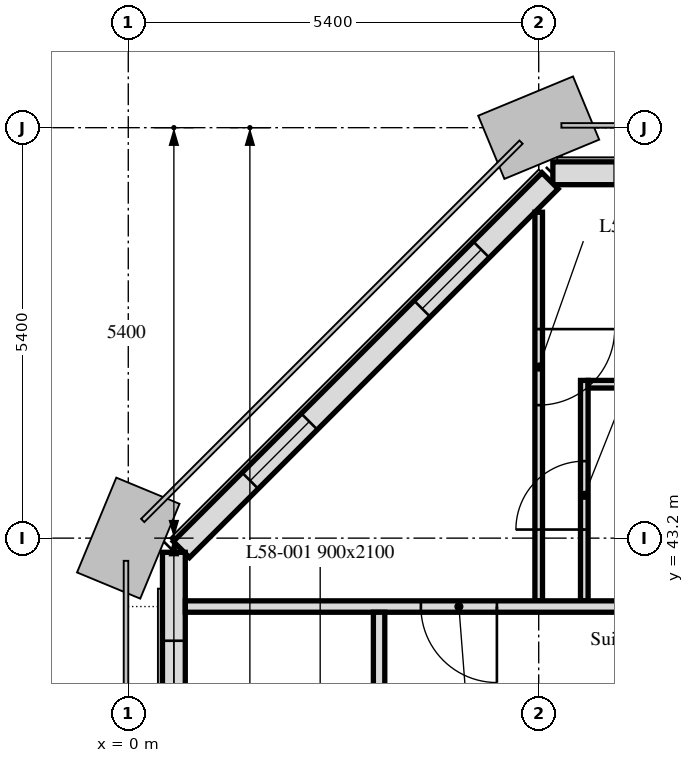
"""IFC4 building model, lengths in metres.
Left out: names, types, materials, properties, quantities, classifications, styles, units other than length and angle.
Written with IfcOpenShell. Run it as: python <this file> out.ifc"""

import sys

from ifc_helpers import new_model, si_unit, direction, frame, frame_2d, origin, place, context, subcontext, project, spatial, rectangle, extrude, element, fill, save


model = new_model("IFC4")
c1 = context("Model", 3, precision=1e-05, world=origin(), true_north=direction((0.0, 1.0)))
c2 = subcontext(c1, "Body", "Model", "MODEL_VIEW")
j1 = project(units=[si_unit("LENGTHUNIT", "METRE"), si_unit("PLANEANGLEUNIT", "RADIAN")], contexts=[c1])
p1 = place(None, origin())
s1 = spatial("IfcSite", under=j1, at=p1, CompositionType="ELEMENT")
p2 = place(p1, origin())
s2 = spatial("IfcBuilding", under=s1, at=p2, CompositionType="ELEMENT")
p3 = place(p2, frame((0.0, 0.0, 230.2)))
s3 = spatial("IfcBuildingStorey", under=s2, at=p3, CompositionType="ELEMENT", Elevation=230.2)
p4 = place(p3, frame((37.614, 48.0, 0.0), z_axis=(0.0, 0.0, 1.0), x_axis=(-1.0, 0.0, 0.0)))
e1 = element("IfcWall", 1, at=p4, inside=s3, PredefinedType="SOLIDWALL", context=c2, shape_type="SweptSolid", body=[
    extrude(rectangle(XDim=32.027, YDim=0.3, at=frame_2d((16.014, 0.0))), origin(), (0.0, 0.0, 1.0), 2.8),
])
p5 = place(p4, frame((2.764, 0.0, 0.9)))
e2 = element("IfcOpeningElement", 2, at=p5, cuts=e1, PredefinedType="OPENING", context=c2, shape_type="SweptSolid", body=[
    extrude(rectangle(XDim=1.1, YDim=1.7, at=frame_2d((0.55, 0.85))), frame((0.0, 0.16, 0.0), z_axis=(0.0, -1.0, 0.0), x_axis=(1.0, 0.0, 0.0)), (0.0, 0.0, 1.0), 0.32),
])
p6 = place(p4, frame((6.214, 0.0, 0.9)))
e3 = element("IfcOpeningElement", 3, at=p6, cuts=e1, PredefinedType="OPENING", context=c2, shape_type="SweptSolid", body=[
    extrude(rectangle(XDim=3.4, YDim=1.7, at=frame_2d((1.7, 0.85))), frame((0.0, 0.16, 0.0), z_axis=(0.0, -1.0, 0.0), x_axis=(1.0, 0.0, 0.0)), (0.0, 0.0, 1.0), 0.32),
])
p7 = place(p4, frame((13.564, 0.0, 0.9)))
e4 = element("IfcOpeningElement", 4, at=p7, cuts=e1, PredefinedType="OPENING", context=c2, shape_type="SweptSolid", body=[
    extrude(rectangle(XDim=1.1, YDim=1.7, at=frame_2d((0.55, 0.85))), frame((0.0, 0.16, 0.0), z_axis=(0.0, -1.0, 0.0), x_axis=(1.0, 0.0, 0.0)), (0.0, 0.0, 1.0), 0.32),
])
p8 = place(p4, frame((17.014, 0.0, 0.9)))
e5 = element("IfcOpeningElement", 5, at=p8, cuts=e1, PredefinedType="OPENING", context=c2, shape_type="SweptSolid", body=[
    extrude(rectangle(XDim=3.4, YDim=1.7, at=frame_2d((1.7, 0.85))), frame((0.0, 0.16, 0.0), z_axis=(0.0, -1.0, 0.0), x_axis=(1.0, 0.0, 0.0)), (0.0, 0.0, 1.0), 0.32),
])
p9 = place(p4, frame((24.364, 0.0, 0.9)))
e6 = element("IfcOpeningElement", 6, at=p9, cuts=e1, PredefinedType="OPENING", context=c2, shape_type="SweptSolid", body=[
    extrude(rectangle(XDim=1.1, YDim=1.7, at=frame_2d((0.55, 0.85))), frame((0.0, 0.16, 0.0), z_axis=(0.0, -1.0, 0.0), x_axis=(1.0, 0.0, 0.0)), (0.0, 0.0, 1.0), 0.32),
])
p10 = place(p4, frame((27.814, 0.0, 0.9)))
e7 = element("IfcOpeningElement", 7, at=p10, cuts=e1, PredefinedType="OPENING", context=c2, shape_type="SweptSolid", body=[
    extrude(rectangle(XDim=3.4, YDim=1.7, at=frame_2d((1.7, 0.85))), frame((0.0, 0.16, 0.0), z_axis=(0.0, -1.0, 0.0), x_axis=(1.0, 0.0, 0.0)), (0.0, 0.0, 1.0), 0.32),
])
p11 = place(p3, frame((5.55, 47.901, 0.0), z_axis=(0.0, 0.0, 1.0), x_axis=(-0.707106781187, -0.707106781187, 0.0)))
e8 = element("IfcWall", 8, at=p11, inside=s3, PredefinedType="SOLIDWALL", context=c2, shape_type="SweptSolid", body=[
    extrude(rectangle(XDim=6.86, YDim=0.3, at=frame_2d((3.43, 0.0))), origin(), (0.0, 0.0, 1.0), 2.8),
])
p12 = place(p11, frame((1.28, 0.0, 0.9)))
e9 = element("IfcOpeningElement", 9, at=p12, cuts=e8, PredefinedType="OPENING", context=c2, shape_type="SweptSolid", body=[
    extrude(rectangle(XDim=1.1, YDim=1.7, at=frame_2d((0.55, 0.85))), frame((0.0, 0.16, 0.0), z_axis=(0.0, -1.0, 0.0), x_axis=(1.0, 0.0, 0.0)), (0.0, 0.0, 1.0), 0.32),
])
p13 = place(p11, frame((4.48, 0.0, 0.9)))
e10 = element("IfcOpeningElement", 10, at=p13, cuts=e8, PredefinedType="OPENING", context=c2, shape_type="SweptSolid", body=[
    extrude(rectangle(XDim=1.1, YDim=1.7, at=frame_2d((0.55, 0.85))), frame((0.0, 0.16, 0.0), z_axis=(0.0, -1.0, 0.0), x_axis=(1.0, 0.0, 0.0)), (0.0, 0.0, 1.0), 0.32),
])
p14 = place(p3, frame((0.6, 43.014, 0.0), z_axis=(0.0, 0.0, 1.0), x_axis=(0.0, -1.0, 0.0)))
e11 = element("IfcWall", 11, at=p14, inside=s3, PredefinedType="SOLIDWALL", context=c2, shape_type="SweptSolid", body=[
    extrude(rectangle(XDim=32.027, YDim=0.3, at=frame_2d((16.014, 0.0))), origin(), (0.0, 0.0, 1.0), 2.8),
])
p15 = place(p14, frame((1.164, 0.0, 0.9)))
e12 = element("IfcOpeningElement", 12, at=p15, cuts=e11, PredefinedType="OPENING", context=c2, shape_type="SweptSolid", body=[
    extrude(rectangle(XDim=1.1, YDim=1.7, at=frame_2d((0.55, 0.85))), frame((0.0, 0.16, 0.0), z_axis=(0.0, -1.0, 0.0), x_axis=(1.0, 0.0, 0.0)), (0.0, 0.0, 1.0), 0.32),
])
p16 = place(p14, frame((2.589, 0.0, 0.9)))
e13 = element("IfcOpeningElement", 13, at=p16, cuts=e11, PredefinedType="OPENING", context=c2, shape_type="SweptSolid", body=[
    extrude(rectangle(XDim=0.65, YDim=1.7, at=frame_2d((0.325, 0.85))), frame((0.0, 0.16, 0.0), z_axis=(0.0, -1.0, 0.0), x_axis=(1.0, 0.0, 0.0)), (0.0, 0.0, 1.0), 0.32),
])
p17 = place(p14, frame((6.214, 0.0, 0.9)))
e14 = element("IfcOpeningElement", 14, at=p17, cuts=e11, PredefinedType="OPENING", context=c2, shape_type="SweptSolid", body=[
    extrude(rectangle(XDim=3.4, YDim=1.7, at=frame_2d((1.7, 0.85))), frame((0.0, 0.16, 0.0), z_axis=(0.0, -1.0, 0.0), x_axis=(1.0, 0.0, 0.0)), (0.0, 0.0, 1.0), 0.32),
])
p18 = place(p14, frame((11.964, 0.0, 0.9)))
e15 = element("IfcOpeningElement", 15, at=p18, cuts=e11, PredefinedType="OPENING", context=c2, shape_type="SweptSolid", body=[
    extrude(rectangle(XDim=1.1, YDim=1.7, at=frame_2d((0.55, 0.85))), frame((0.0, 0.16, 0.0), z_axis=(0.0, -1.0, 0.0), x_axis=(1.0, 0.0, 0.0)), (0.0, 0.0, 1.0), 0.32),
])
p19 = place(p14, frame((13.564, 0.0, 0.9)))
e16 = element("IfcOpeningElement", 16, at=p19, cuts=e11, PredefinedType="OPENING", context=c2, shape_type="SweptSolid", body=[
    extrude(rectangle(XDim=1.1, YDim=1.7, at=frame_2d((0.55, 0.85))), frame((0.0, 0.16, 0.0), z_axis=(0.0, -1.0, 0.0), x_axis=(1.0, 0.0, 0.0)), (0.0, 0.0, 1.0), 0.32),
])
p20 = place(p14, frame((17.014, 0.0, 0.9)))
e17 = element("IfcOpeningElement", 17, at=p20, cuts=e11, PredefinedType="OPENING", context=c2, shape_type="SweptSolid", body=[
    extrude(rectangle(XDim=3.4, YDim=1.7, at=frame_2d((1.7, 0.85))), frame((0.0, 0.16, 0.0), z_axis=(0.0, -1.0, 0.0), x_axis=(1.0, 0.0, 0.0)), (0.0, 0.0, 1.0), 0.32),
])
p21 = place(p14, frame((22.764, 0.0, 0.9)))
e18 = element("IfcOpeningElement", 18, at=p21, cuts=e11, PredefinedType="OPENING", context=c2, shape_type="SweptSolid", body=[
    extrude(rectangle(XDim=1.1, YDim=1.7, at=frame_2d((0.55, 0.85))), frame((0.0, 0.16, 0.0), z_axis=(0.0, -1.0, 0.0), x_axis=(1.0, 0.0, 0.0)), (0.0, 0.0, 1.0), 0.32),
])
p22 = place(p14, frame((24.364, 0.0, 0.9)))
e19 = element("IfcOpeningElement", 19, at=p22, cuts=e11, PredefinedType="OPENING", context=c2, shape_type="SweptSolid", body=[
    extrude(rectangle(XDim=1.1, YDim=1.7, at=frame_2d((0.55, 0.85))), frame((0.0, 0.16, 0.0), z_axis=(0.0, -1.0, 0.0), x_axis=(1.0, 0.0, 0.0)), (0.0, 0.0, 1.0), 0.32),
])
p23 = place(p14, frame((28.164, 0.0, 0.9)))
e20 = element("IfcOpeningElement", 20, at=p23, cuts=e11, PredefinedType="OPENING", context=c2, shape_type="SweptSolid", body=[
    extrude(rectangle(XDim=1.1, YDim=1.7, at=frame_2d((0.55, 0.85))), frame((0.0, 0.16, 0.0), z_axis=(0.0, -1.0, 0.0), x_axis=(1.0, 0.0, 0.0)), (0.0, 0.0, 1.0), 0.32),
])
p24 = place(p14, frame((29.764, 0.0, 0.9)))
e21 = element("IfcOpeningElement", 21, at=p24, cuts=e11, PredefinedType="OPENING", context=c2, shape_type="SweptSolid", body=[
    extrude(rectangle(XDim=1.1, YDim=1.7, at=frame_2d((0.55, 0.85))), frame((0.0, 0.16, 0.0), z_axis=(0.0, -1.0, 0.0), x_axis=(1.0, 0.0, 0.0)), (0.0, 0.0, 1.0), 0.32),
])
p25 = place(p3, frame((5.4, 47.488, 0.0), z_axis=(0.0, 0.0, 1.0), x_axis=(0.0, -1.0, 0.0)))
e22 = element("IfcWall", 22, at=p25, inside=s3, PredefinedType="PARTITIONING", context=c2, shape_type="SweptSolid", body=[
    extrude(rectangle(XDim=5.113, YDim=0.1, at=frame_2d((2.556, 0.0))), origin(), (0.0, 0.0, 1.0), 2.8),
])
p26 = place(p25, frame((1.538, 0.0, 0.0)))
e23 = element("IfcOpeningElement", 23, at=p26, cuts=e22, PredefinedType="OPENING", context=c2, shape_type="SweptSolid", body=[
    extrude(rectangle(XDim=1.0, YDim=2.1, at=frame_2d((0.5, 1.05))), frame((0.0, 0.05, 0.0), z_axis=(0.0, -1.0, 0.0), x_axis=(1.0, 0.0, 0.0)), (0.0, 0.0, 1.0), 0.1),
])
p27 = place(p3, frame((6.0, 42.375, 0.0), z_axis=(0.0, 0.0, 1.0), x_axis=(0.0, 1.0, 0.0)))
e24 = element("IfcWall", 24, at=p27, inside=s3, PredefinedType="PARTITIONING", context=c2, shape_type="SweptSolid", body=[
    extrude(rectangle(XDim=2.9, YDim=0.1, at=frame_2d((1.45, 0.0))), origin(), (0.0, 0.0, 1.0), 2.8),
])
p28 = place(p27, frame((0.938, 0.0, 0.0)))
e25 = element("IfcOpeningElement", 25, at=p28, cuts=e24, PredefinedType="OPENING", context=c2, shape_type="SweptSolid", body=[
    extrude(rectangle(XDim=0.9, YDim=2.1, at=frame_2d((0.45, 1.05))), frame((0.0, 0.05, 0.0), z_axis=(0.0, -1.0, 0.0), x_axis=(1.0, 0.0, 0.0)), (0.0, 0.0, 1.0), 0.1),
])
p29 = place(p3, frame((6.05, 45.225, 0.0), z_axis=(0.0, 0.0, 1.0), x_axis=(1.0, 0.0, 0.0)))
e26 = element("IfcWall", 26, at=p29, inside=s3, PredefinedType="PARTITIONING", context=c2, shape_type="SweptSolid", body=[
    extrude(rectangle(XDim=2.4, YDim=0.1, at=frame_2d((1.2, 0.0))), origin(), (0.0, 0.0, 1.0), 2.8),
])
p30 = place(p3, frame((42.449, 42.3, 0.0), z_axis=(0.0, 0.0, 1.0), x_axis=(-1.0, 0.0, 0.0)))
e27 = element("IfcWall", 27, at=p30, inside=s3, PredefinedType="PARTITIONING", context=c2, shape_type="SweptSolid", body=[
    extrude(rectangle(XDim=41.698, YDim=0.15, at=frame_2d((20.849, 0.0))), origin(), (0.0, 0.0, 1.0), 2.2),
])
p31 = place(p30, frame((1.132, 0.0, 0.0)))
e28 = element("IfcOpeningElement", 28, at=p31, cuts=e27, PredefinedType="OPENING", context=c2, shape_type="SweptSolid", body=[
    extrude(rectangle(XDim=1.0, YDim=2.1, at=frame_2d((0.5, 1.05))), frame((0.0, 0.075, 0.0), z_axis=(0.0, -1.0, 0.0), x_axis=(1.0, 0.0, 0.0)), (0.0, 0.0, 1.0), 0.15),
])
p32 = place(p30, frame((13.049, 0.0, 0.0)))
e29 = element("IfcOpeningElement", 29, at=p32, cuts=e27, PredefinedType="OPENING", context=c2, shape_type="SweptSolid", body=[
    extrude(rectangle(XDim=1.0, YDim=2.1, at=frame_2d((0.5, 1.05))), frame((0.0, 0.075, 0.0), z_axis=(0.0, -1.0, 0.0), x_axis=(1.0, 0.0, 0.0)), (0.0, 0.0, 1.0), 0.15),
])
p33 = place(p30, frame((18.449, 0.0, 0.0)))
e30 = element("IfcOpeningElement", 30, at=p33, cuts=e27, PredefinedType="OPENING", context=c2, shape_type="SweptSolid", body=[
    extrude(rectangle(XDim=1.0, YDim=2.1, at=frame_2d((0.5, 1.05))), frame((0.0, 0.075, 0.0), z_axis=(0.0, -1.0, 0.0), x_axis=(1.0, 0.0, 0.0)), (0.0, 0.0, 1.0), 0.15),
])
p34 = place(p30, frame((23.049, 0.0, 0.0)))
e31 = element("IfcOpeningElement", 31, at=p34, cuts=e27, PredefinedType="OPENING", context=c2, shape_type="SweptSolid", body=[
    extrude(rectangle(XDim=1.0, YDim=2.1, at=frame_2d((0.5, 1.05))), frame((0.0, 0.075, 0.0), z_axis=(0.0, -1.0, 0.0), x_axis=(1.0, 0.0, 0.0)), (0.0, 0.0, 1.0), 0.15),
])
p35 = place(p30, frame((37.599, 0.0, 0.0)))
e32 = element("IfcOpeningElement", 32, at=p35, cuts=e27, PredefinedType="OPENING", context=c2, shape_type="SweptSolid", body=[
    extrude(rectangle(XDim=1.0, YDim=2.1, at=frame_2d((0.5, 1.05))), frame((0.0, 0.075, 0.0), z_axis=(0.0, -1.0, 0.0), x_axis=(1.0, 0.0, 0.0)), (0.0, 0.0, 1.0), 0.15),
])
p36 = place(p3, frame((3.3, 11.775, 0.0), z_axis=(0.0, 0.0, 1.0), x_axis=(0.0, 1.0, 0.0)))
e33 = element("IfcWall", 33, at=p36, inside=s3, PredefinedType="PARTITIONING", context=c2, shape_type="SweptSolid", body=[
    extrude(rectangle(XDim=30.45, YDim=0.15, at=frame_2d((15.225, 0.0))), origin(), (0.0, 0.0, 1.0), 2.2),
])
p37 = place(p36, frame((17.425, 0.0, 0.0)))
e34 = element("IfcOpeningElement", 34, at=p37, cuts=e33, PredefinedType="OPENING", context=c2, shape_type="SweptSolid", body=[
    extrude(rectangle(XDim=1.0, YDim=2.1, at=frame_2d((0.5, 1.05))), frame((0.0, 0.075, 0.0), z_axis=(0.0, -1.0, 0.0), x_axis=(1.0, 0.0, 0.0)), (0.0, 0.0, 1.0), 0.15),
])
p38 = place(p36, frame((1.675, 0.0, 0.0)))
e35 = element("IfcOpeningElement", 35, at=p38, cuts=e33, PredefinedType="OPENING", context=c2, shape_type="SweptSolid", body=[
    extrude(rectangle(XDim=1.0, YDim=2.1, at=frame_2d((0.5, 1.05))), frame((0.0, 0.075, 0.0), z_axis=(0.0, -1.0, 0.0), x_axis=(1.0, 0.0, 0.0)), (0.0, 0.0, 1.0), 0.15),
])
p39 = place(p36, frame((9.325, 0.0, 0.0)))
e36 = element("IfcOpeningElement", 36, at=p39, cuts=e33, PredefinedType="OPENING", context=c2, shape_type="SweptSolid", body=[
    extrude(rectangle(XDim=1.0, YDim=2.1, at=frame_2d((0.5, 1.05))), frame((0.0, 0.075, 0.0), z_axis=(0.0, -1.0, 0.0), x_axis=(1.0, 0.0, 0.0)), (0.0, 0.0, 1.0), 0.15),
])
p40 = place(p36, frame((23.258, 0.0, 0.0)))
e37 = element("IfcOpeningElement", 37, at=p40, cuts=e33, PredefinedType="OPENING", context=c2, shape_type="SweptSolid", body=[
    extrude(rectangle(XDim=1.0, YDim=2.1, at=frame_2d((0.5, 1.05))), frame((0.0, 0.075, 0.0), z_axis=(0.0, -1.0, 0.0), x_axis=(1.0, 0.0, 0.0)), (0.0, 0.0, 1.0), 0.15),
])
p41 = place(p12, origin())
e38 = element("IfcWindow", 38, at=p41, inside=s3, PartitioningType="SINGLE_PANEL", PredefinedType="WINDOW", context=c2, shape_type="SweptSolid", body=[
    extrude(rectangle(XDim=1.1, YDim=1.7, at=frame_2d((0.55, 0.85))), frame((0.0, 0.03, 0.0), z_axis=(0.0, -1.0, 0.0), x_axis=(1.0, 0.0, 0.0)), (0.0, 0.0, 1.0), 0.06),
])
fill(e9, e38)
p42 = place(p13, origin())
e39 = element("IfcWindow", 39, at=p42, inside=s3, PartitioningType="SINGLE_PANEL", PredefinedType="WINDOW", context=c2, shape_type="SweptSolid", body=[
    extrude(rectangle(XDim=1.1, YDim=1.7, at=frame_2d((0.55, 0.85))), frame((0.0, 0.03, 0.0), z_axis=(0.0, -1.0, 0.0), x_axis=(1.0, 0.0, 0.0)), (0.0, 0.0, 1.0), 0.06),
])
fill(e10, e39)
p43 = place(p15, origin())
e40 = element("IfcWindow", 40, at=p43, inside=s3, PartitioningType="SINGLE_PANEL", PredefinedType="WINDOW", context=c2, shape_type="SweptSolid", body=[
    extrude(rectangle(XDim=1.1, YDim=1.7, at=frame_2d((0.55, 0.85))), frame((0.0, 0.03, 0.0), z_axis=(0.0, -1.0, 0.0), x_axis=(1.0, 0.0, 0.0)), (0.0, 0.0, 1.0), 0.06),
])
fill(e12, e40)
p44 = place(p28, origin())
e41 = element("IfcDoor", 41, at=p44, inside=s3, OperationType="SINGLE_SWING_LEFT", PredefinedType="DOOR", context=c2, shape_type="SweptSolid", body=[
    extrude(rectangle(XDim=0.9, YDim=2.1, at=frame_2d((0.45, 1.05))), frame((0.0, 0.025, 0.0), z_axis=(0.0, -1.0, 0.0), x_axis=(1.0, 0.0, 0.0)), (0.0, 0.0, 1.0), 0.05),
])
fill(e25, e41)
p45 = place(p26, origin())
e42 = element("IfcDoor", 42, at=p45, inside=s3, OperationType="SINGLE_SWING_LEFT", PredefinedType="DOOR", context=c2, shape_type="SweptSolid", body=[
    extrude(rectangle(XDim=1.0, YDim=2.1, at=frame_2d((0.5, 1.05))), frame((0.0, 0.025, 0.0), z_axis=(0.0, -1.0, 0.0), x_axis=(1.0, 0.0, 0.0)), (0.0, 0.0, 1.0), 0.05),
])
fill(e23, e42)
p46 = place(p35, origin())
e43 = element("IfcDoor", 43, at=p46, inside=s3, OperationType="SINGLE_SWING_RIGHT", PredefinedType="DOOR", context=c2, shape_type="SweptSolid", body=[
    extrude(rectangle(XDim=1.0, YDim=2.1, at=frame_2d((0.5, 1.05))), frame((0.0, 0.025, 0.0), z_axis=(0.0, -1.0, 0.0), x_axis=(1.0, 0.0, 0.0)), (0.0, 0.0, 1.0), 0.05),
])
fill(e32, e43)
save(model, sys.argv[1])
